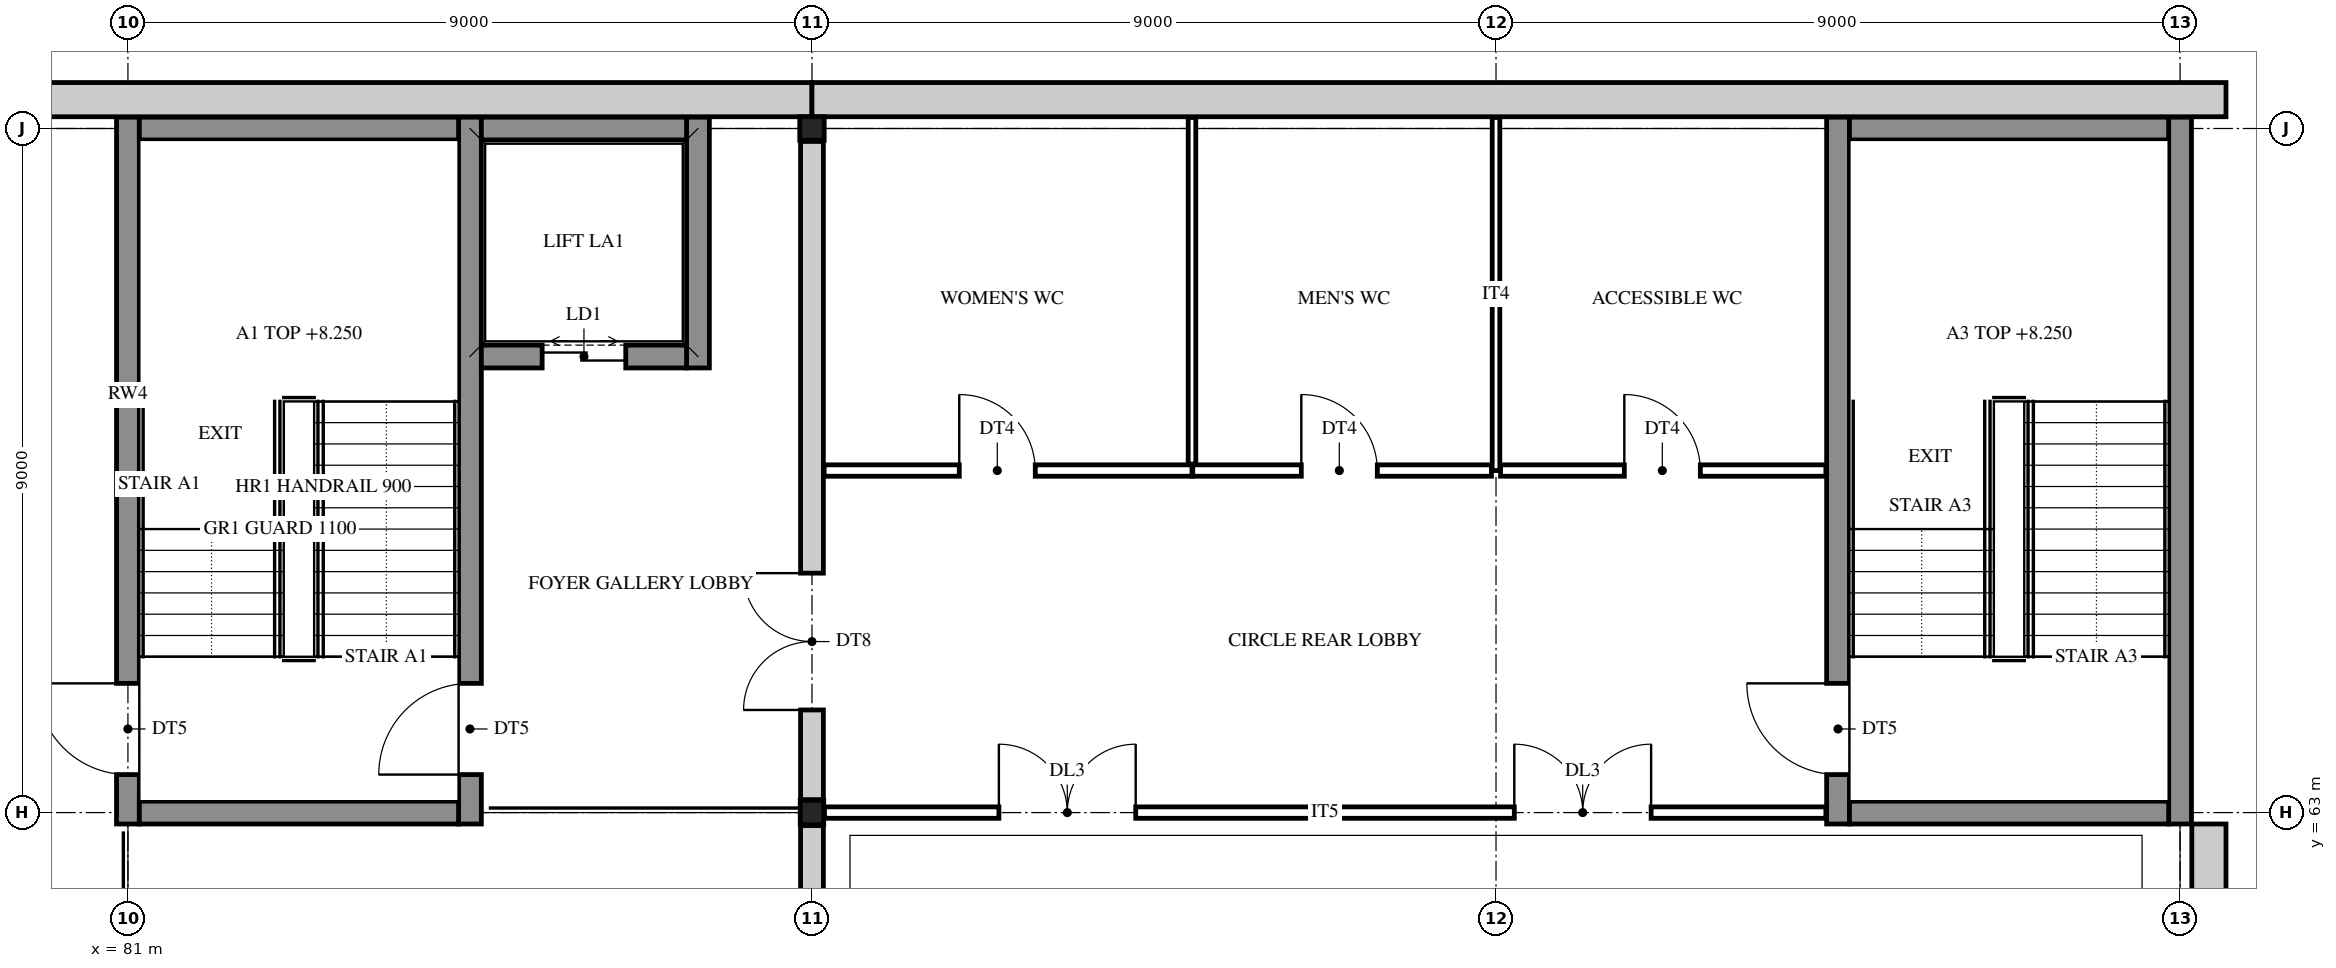
"""IFC4 building model, lengths in metres.
Left out: names, types, materials, properties, quantities, classifications, styles, units other than length and angle.
Written with IfcOpenShell. Run it as: python <this file> out.ifc"""

import sys

from ifc_helpers import new_model, si_unit, direction, frame, frame_2d, origin, origin_2d, place, context, subcontext, project, spatial, rectangle, i_section, extrude, element, fill, save


model = new_model("IFC4")
c1 = context("Model", 3, precision=1e-05, world=origin(), true_north=direction((0.0, 1.0)))
c2 = subcontext(c1, "Body", "Model", "MODEL_VIEW")
j1 = project(units=[si_unit("LENGTHUNIT", "METRE"), si_unit("PLANEANGLEUNIT", "RADIAN")], contexts=[c1])
p1 = place(None, origin())
s1 = spatial("IfcSite", under=j1, at=p1, CompositionType="ELEMENT")
p2 = place(p1, origin())
s2 = spatial("IfcBuilding", under=s1, at=p2, CompositionType="ELEMENT")
p3 = place(p2, frame((0.0, 0.0, 6.0)))
s3 = spatial("IfcBuildingStorey", under=s2, at=p3, CompositionType="ELEMENT", Elevation=6.0)
for number, where, z_axis, x_axis in (
    (1, (90.0, 63.0, 0.0), (0.0, 0.0, 1.0), (1.0, 0.0, 0.0)),
    (2, (90.0, 72.0, 0.0), (0.0, 0.0, 1.0), (0.0, 1.0, 0.0)),
):
    element("IfcColumn", number, at=place(p3, frame(where, z_axis=z_axis, x_axis=x_axis)), inside=s3, PredefinedType="COLUMN", context=c2, shape_type="SweptSolid", body=[
        extrude(i_section(OverallWidth=0.309, OverallDepth=0.321, WebThickness=0.014, FlangeThickness=0.022, FilletRadius=0.017, at=origin_2d()), origin(), (0.0, 0.0, 1.0), 4.5),
    ])
p4 = place(p3, frame((81.0, 62.85, 0.0), z_axis=(0.0, 0.0, 1.0), x_axis=(0.0, 1.0, 0.0)))
e3 = element("IfcWall", 3, at=p4, inside=s3, PredefinedType="SHEAR", context=c2, shape_type="SweptSolid", body=[
    extrude(rectangle(XDim=9.3, YDim=0.3, at=frame_2d((4.65, 0.0))), origin(), (0.0, 0.0, 1.0), 4.5),
])
p5 = place(p4, frame((0.65, 0.0, 0.0)))
e4 = element("IfcOpeningElement", 4, at=p5, cuts=e3, PredefinedType="OPENING", context=c2, shape_type="SweptSolid", body=[
    extrude(rectangle(XDim=1.2, YDim=2.1, at=frame_2d((0.6, 1.05))), frame((0.0, 0.16, 0.0), z_axis=(0.0, -1.0, 0.0), x_axis=(1.0, 0.0, 0.0)), (0.0, 0.0, 1.0), 0.32),
])
p6 = place(p3, frame((85.5, 62.85, 0.0), z_axis=(0.0, 0.0, 1.0), x_axis=(0.0, 1.0, 0.0)))
e5 = element("IfcWall", 5, at=p6, inside=s3, PredefinedType="SHEAR", context=c2, shape_type="SweptSolid", body=[
    extrude(rectangle(XDim=9.3, YDim=0.3, at=frame_2d((4.65, 0.0))), origin(), (0.0, 0.0, 1.0), 4.5),
])
p7 = place(p6, frame((0.65, 0.0, 0.0)))
e6 = element("IfcOpeningElement", 6, at=p7, cuts=e5, PredefinedType="OPENING", context=c2, shape_type="SweptSolid", body=[
    extrude(rectangle(XDim=1.2, YDim=2.1, at=frame_2d((0.6, 1.05))), frame((0.0, 0.16, 0.0), z_axis=(0.0, -1.0, 0.0), x_axis=(1.0, 0.0, 0.0)), (0.0, 0.0, 1.0), 0.32),
])
p8 = place(p3, frame((88.5, 68.85, 0.0), z_axis=(0.0, 0.0, 1.0), x_axis=(0.0, 1.0, 0.0)))
e7 = element("IfcWall", 7, at=p8, inside=s3, PredefinedType="SHEAR", context=c2, shape_type="SweptSolid", body=[
    extrude(rectangle(XDim=3.3, YDim=0.3, at=frame_2d((1.65, 0.0))), origin(), (0.0, 0.0, 1.0), 4.5),
])
p9 = place(p3, frame((103.5, 62.85, 0.0), z_axis=(0.0, 0.0, 1.0), x_axis=(0.0, 1.0, 0.0)))
e8 = element("IfcWall", 8, at=p9, inside=s3, PredefinedType="SHEAR", context=c2, shape_type="SweptSolid", body=[
    extrude(rectangle(XDim=9.3, YDim=0.3, at=frame_2d((4.65, 0.0))), origin(), (0.0, 0.0, 1.0), 4.5),
])
p10 = place(p9, frame((0.65, 0.0, 0.0)))
e9 = element("IfcOpeningElement", 9, at=p10, cuts=e8, PredefinedType="OPENING", context=c2, shape_type="SweptSolid", body=[
    extrude(rectangle(XDim=1.2, YDim=2.1, at=frame_2d((0.6, 1.05))), frame((0.0, 0.16, 0.0), z_axis=(0.0, -1.0, 0.0), x_axis=(1.0, 0.0, 0.0)), (0.0, 0.0, 1.0), 0.32),
])
p11 = place(p3, frame((108.0, 62.85, 0.0), z_axis=(0.0, 0.0, 1.0), x_axis=(0.0, 1.0, 0.0)))
e10 = element("IfcWall", 10, at=p11, inside=s3, PredefinedType="SHEAR", context=c2, shape_type="SweptSolid", body=[
    extrude(rectangle(XDim=9.3, YDim=0.3, at=frame_2d((4.65, 0.0))), origin(), (0.0, 0.0, 1.0), 4.5),
])
for number, where, z_axis, x_axis in (
    (11, (81.15, 63.0, 0.0), (0.0, 0.0, 1.0), (1.0, 0.0, 0.0)),
    (12, (103.65, 63.0, 0.0), (0.0, 0.0, 1.0), (1.0, 0.0, 0.0)),
):
    element("IfcWall", number, at=place(p3, frame(where, z_axis=z_axis, x_axis=x_axis)), inside=s3, PredefinedType="SHEAR", context=c2, shape_type="SweptSolid", body=[
        extrude(rectangle(XDim=4.2, YDim=0.3, at=frame_2d((2.1, 0.0))), origin(), (0.0, 0.0, 1.0), 4.5),
    ])
p12 = place(p3, frame((85.65, 69.0, 0.0), z_axis=(0.0, 0.0, 1.0), x_axis=(1.0, 0.0, 0.0)))
e13 = element("IfcWall", 13, at=p12, inside=s3, PredefinedType="SHEAR", context=c2, shape_type="SweptSolid", body=[
    extrude(rectangle(XDim=2.7, YDim=0.3, at=frame_2d((1.35, 0.0))), origin(), (0.0, 0.0, 1.0), 4.5),
])
p13 = place(p12, frame((0.8, 0.0, 0.0)))
e14 = element("IfcOpeningElement", 14, at=p13, cuts=e13, PredefinedType="OPENING", context=c2, shape_type="SweptSolid", body=[
    extrude(rectangle(XDim=1.1, YDim=2.1, at=frame_2d((0.55, 1.05))), frame((0.0, 0.16, 0.0), z_axis=(0.0, -1.0, 0.0), x_axis=(1.0, 0.0, 0.0)), (0.0, 0.0, 1.0), 0.32),
])
p14 = place(p3, frame((81.15, 72.0, 0.0), z_axis=(0.0, 0.0, 1.0), x_axis=(1.0, 0.0, 0.0)))
e15 = element("IfcWall", 15, at=p14, inside=s3, PredefinedType="SHEAR", context=c2, shape_type="SweptSolid", body=[
    extrude(rectangle(XDim=4.2, YDim=0.3, at=frame_2d((2.1, 0.0))), origin(), (0.0, 0.0, 1.0), 4.5),
])
p15 = place(p3, frame((85.65, 72.0, 0.0), z_axis=(0.0, 0.0, 1.0), x_axis=(1.0, 0.0, 0.0)))
e16 = element("IfcWall", 16, at=p15, inside=s3, PredefinedType="SHEAR", context=c2, shape_type="SweptSolid", body=[
    extrude(rectangle(XDim=2.7, YDim=0.3, at=frame_2d((1.35, 0.0))), origin(), (0.0, 0.0, 1.0), 4.5),
])
p16 = place(p3, frame((103.65, 72.0, 0.0), z_axis=(0.0, 0.0, 1.0), x_axis=(1.0, 0.0, 0.0)))
e17 = element("IfcWall", 17, at=p16, inside=s3, PredefinedType="SHEAR", context=c2, shape_type="SweptSolid", body=[
    extrude(rectangle(XDim=4.2, YDim=0.3, at=frame_2d((2.1, 0.0))), origin(), (0.0, 0.0, 1.0), 4.5),
])
p17 = place(p3, frame((75.75, 72.379, 0.0), z_axis=(0.0, 0.0, 1.0), x_axis=(1.0, 0.0, 0.0)))
e18 = element("IfcWall", 18, at=p17, inside=s3, PredefinedType="STANDARD", context=c2, shape_type="SweptSolid", body=[
    extrude(rectangle(XDim=14.25, YDim=0.45, at=frame_2d((7.125, 0.0))), origin(), (0.0, 0.0, 1.0), 4.5),
])
p18 = place(p17, frame((1.8, 0.0, 0.9)))
e19 = element("IfcOpeningElement", 19, at=p18, cuts=e18, PredefinedType="OPENING", context=c2, shape_type="SweptSolid", body=[
    extrude(rectangle(XDim=2.4, YDim=2.8, at=frame_2d((1.2, 1.4))), frame((0.0, 0.235, 0.0), z_axis=(0.0, -1.0, 0.0), x_axis=(1.0, 0.0, 0.0)), (0.0, 0.0, 1.0), 0.47),
])
p19 = place(p3, frame((90.0, 72.379, 0.0), z_axis=(0.0, 0.0, 1.0), x_axis=(1.0, 0.0, 0.0)))
e20 = element("IfcWall", 20, at=p19, inside=s3, PredefinedType="STANDARD", context=c2, shape_type="SweptSolid", body=[
    extrude(rectangle(XDim=18.604, YDim=0.45, at=frame_2d((9.302, 0.0))), origin(), (0.0, 0.0, 1.0), 4.5),
])
p20 = place(p3, frame((108.379, 62.85, 0.0), z_axis=(0.0, 0.0, 1.0), x_axis=(0.0, -1.0, 0.0)))
e21 = element("IfcWall", 21, at=p20, inside=s3, PredefinedType="STANDARD", context=c2, shape_type="SweptSolid", body=[
    extrude(rectangle(XDim=17.7, YDim=0.45, at=frame_2d((8.85, 0.0))), origin(), (0.0, 0.0, 1.0), 4.5),
])
p21 = place(p3, frame((90.0, 54.17, 0.0), z_axis=(0.0, 0.0, 1.0), x_axis=(0.0, 1.0, 0.0)))
e22 = element("IfcWall", 22, at=p21, inside=s3, PredefinedType="STANDARD", context=c2, shape_type="SweptSolid", body=[
    extrude(rectangle(XDim=8.659, YDim=0.3, at=frame_2d((4.33, 0.0))), origin(), (0.0, 0.0, 1.0), 3.718),
])
p22 = place(p3, frame((90.0, 63.17, 0.0), z_axis=(0.0, 0.0, 1.0), x_axis=(0.0, 1.0, 0.0)))
e23 = element("IfcWall", 23, at=p22, inside=s3, PredefinedType="STANDARD", context=c2, shape_type="SweptSolid", body=[
    extrude(rectangle(XDim=8.659, YDim=0.3, at=frame_2d((4.33, 0.0))), origin(), (0.0, 0.0, 1.0), 3.718),
])
p23 = place(p22, frame((1.179, 0.0, 0.0)))
e24 = element("IfcOpeningElement", 24, at=p23, cuts=e23, PredefinedType="OPENING", context=c2, shape_type="SweptSolid", body=[
    extrude(rectangle(XDim=1.8, YDim=2.1, at=frame_2d((0.9, 1.05))), frame((0.0, 0.16, 0.0), z_axis=(0.0, -1.0, 0.0), x_axis=(1.0, 0.0, 0.0)), (0.0, 0.0, 1.0), 0.32),
])
p24 = place(p3, frame((95.0, 67.585, 0.0), z_axis=(0.0, 0.0, 1.0), x_axis=(0.0, 1.0, 0.0)))
e25 = element("IfcWall", 25, at=p24, inside=s3, PredefinedType="PARTITIONING", context=c2, shape_type="SweptSolid", body=[
    extrude(rectangle(XDim=4.56, YDim=0.1, at=frame_2d((2.28, 0.0))), origin(), (0.0, 0.0, 1.0), 3.718),
])
p25 = place(p3, frame((99.0, 67.5, 0.0), z_axis=(0.0, 0.0, 1.0), x_axis=(0.0, 1.0, 0.0)))
e26 = element("IfcWall", 26, at=p25, inside=s3, PredefinedType="PARTITIONING", context=c2, shape_type="SweptSolid", body=[
    extrude(rectangle(XDim=4.645, YDim=0.1, at=frame_2d((2.322, 0.0))), origin(), (0.0, 0.0, 1.0), 3.718),
])
p26 = place(p3, frame((90.165, 63.0, 0.0), z_axis=(0.0, 0.0, 1.0), x_axis=(1.0, 0.0, 0.0)))
e27 = element("IfcWall", 27, at=p26, inside=s3, PredefinedType="PARTITIONING", context=c2, shape_type="SweptSolid", body=[
    extrude(rectangle(XDim=13.176, YDim=0.15, at=frame_2d((6.588, 0.0))), origin(), (0.0, 0.0, 1.0), 3.718),
])
p27 = place(p26, frame((2.295, 0.0, 0.0)))
e28 = element("IfcOpeningElement", 28, at=p27, cuts=e27, PredefinedType="OPENING", context=c2, shape_type="SweptSolid", body=[
    extrude(rectangle(XDim=1.8, YDim=2.1, at=frame_2d((0.9, 1.05))), frame((0.0, 0.085, 0.0), z_axis=(0.0, -1.0, 0.0), x_axis=(1.0, 0.0, 0.0)), (0.0, 0.0, 1.0), 0.17),
])
p28 = place(p26, frame((9.076, 0.0, 0.0)))
e29 = element("IfcOpeningElement", 29, at=p28, cuts=e27, PredefinedType="OPENING", context=c2, shape_type="SweptSolid", body=[
    extrude(rectangle(XDim=1.8, YDim=2.1, at=frame_2d((0.9, 1.05))), frame((0.0, 0.085, 0.0), z_axis=(0.0, -1.0, 0.0), x_axis=(1.0, 0.0, 0.0)), (0.0, 0.0, 1.0), 0.17),
])
p29 = place(p3, frame((90.16, 67.5, 0.0), z_axis=(0.0, 0.0, 1.0), x_axis=(1.0, 0.0, 0.0)))
e30 = element("IfcWall", 30, at=p29, inside=s3, PredefinedType="PARTITIONING", context=c2, shape_type="SweptSolid", body=[
    extrude(rectangle(XDim=4.84, YDim=0.15, at=frame_2d((2.42, 0.0))), origin(), (0.0, 0.0, 1.0), 3.718),
])
p30 = place(p29, frame((1.778, 0.0, 0.0)))
e31 = element("IfcOpeningElement", 31, at=p30, cuts=e30, PredefinedType="OPENING", context=c2, shape_type="SweptSolid", body=[
    extrude(rectangle(XDim=1.0, YDim=2.1, at=frame_2d((0.5, 1.05))), frame((0.0, 0.085, 0.0), z_axis=(0.0, -1.0, 0.0), x_axis=(1.0, 0.0, 0.0)), (0.0, 0.0, 1.0), 0.17),
])
p31 = place(p3, frame((95.01, 67.5, 0.0), z_axis=(0.0, 0.0, 1.0), x_axis=(1.0, 0.0, 0.0)))
e32 = element("IfcWall", 32, at=p31, inside=s3, PredefinedType="PARTITIONING", context=c2, shape_type="SweptSolid", body=[
    extrude(rectangle(XDim=3.93, YDim=0.15, at=frame_2d((1.965, 0.0))), origin(), (0.0, 0.0, 1.0), 3.718),
])
p32 = place(p31, frame((1.428, 0.0, 0.0)))
e33 = element("IfcOpeningElement", 33, at=p32, cuts=e32, PredefinedType="OPENING", context=c2, shape_type="SweptSolid", body=[
    extrude(rectangle(XDim=1.0, YDim=2.1, at=frame_2d((0.5, 1.05))), frame((0.0, 0.085, 0.0), z_axis=(0.0, -1.0, 0.0), x_axis=(1.0, 0.0, 0.0)), (0.0, 0.0, 1.0), 0.17),
])
p33 = place(p3, frame((99.06, 67.5, 0.0), z_axis=(0.0, 0.0, 1.0), x_axis=(1.0, 0.0, 0.0)))
e34 = element("IfcWall", 34, at=p33, inside=s3, PredefinedType="PARTITIONING", context=c2, shape_type="SweptSolid", body=[
    extrude(rectangle(XDim=4.28, YDim=0.15, at=frame_2d((2.14, 0.0))), origin(), (0.0, 0.0, 1.0), 3.718),
])
p34 = place(p33, frame((1.628, 0.0, 0.0)))
e35 = element("IfcOpeningElement", 35, at=p34, cuts=e34, PredefinedType="OPENING", context=c2, shape_type="SweptSolid", body=[
    extrude(rectangle(XDim=1.0, YDim=2.1, at=frame_2d((0.5, 1.05))), frame((0.0, 0.085, 0.0), z_axis=(0.0, -1.0, 0.0), x_axis=(1.0, 0.0, 0.0)), (0.0, 0.0, 1.0), 0.17),
])
p35 = place(p27, origin())
e36 = element("IfcDoor", 36, at=p35, inside=s3, OperationType="DOUBLE_DOOR_SINGLE_SWING", PredefinedType="DOOR", context=c2, shape_type="SweptSolid", body=[
    extrude(rectangle(XDim=1.8, YDim=2.1, at=frame_2d((0.9, 1.05))), frame((0.0, 0.025, 0.0), z_axis=(0.0, -1.0, 0.0), x_axis=(1.0, 0.0, 0.0)), (0.0, 0.0, 1.0), 0.05),
])
fill(e28, e36)
p36 = place(p28, origin())
e37 = element("IfcDoor", 37, at=p36, inside=s3, OperationType="DOUBLE_DOOR_SINGLE_SWING", PredefinedType="DOOR", context=c2, shape_type="SweptSolid", body=[
    extrude(rectangle(XDim=1.8, YDim=2.1, at=frame_2d((0.9, 1.05))), frame((0.0, 0.025, 0.0), z_axis=(0.0, -1.0, 0.0), x_axis=(1.0, 0.0, 0.0)), (0.0, 0.0, 1.0), 0.05),
])
fill(e29, e37)
p37 = place(p23, origin())
e38 = element("IfcDoor", 38, at=p37, inside=s3, OperationType="DOUBLE_DOOR_SINGLE_SWING", PredefinedType="DOOR", context=c2, shape_type="SweptSolid", body=[
    extrude(rectangle(XDim=1.8, YDim=2.1, at=frame_2d((0.9, 1.05))), frame((0.0, 0.025, 0.0), z_axis=(0.0, -1.0, 0.0), x_axis=(1.0, 0.0, 0.0)), (0.0, 0.0, 1.0), 0.05),
])
fill(e24, e38)
p38 = place(p30, origin())
e39 = element("IfcDoor", 39, at=p38, inside=s3, OperationType="SINGLE_SWING_LEFT", PredefinedType="DOOR", context=c2, shape_type="SweptSolid", body=[
    extrude(rectangle(XDim=1.0, YDim=2.1, at=frame_2d((0.5, 1.05))), frame((0.0, 0.025, 0.0), z_axis=(0.0, -1.0, 0.0), x_axis=(1.0, 0.0, 0.0)), (0.0, 0.0, 1.0), 0.05),
])
fill(e31, e39)
p39 = place(p32, origin())
e40 = element("IfcDoor", 40, at=p39, inside=s3, OperationType="SINGLE_SWING_LEFT", PredefinedType="DOOR", context=c2, shape_type="SweptSolid", body=[
    extrude(rectangle(XDim=1.0, YDim=2.1, at=frame_2d((0.5, 1.05))), frame((0.0, 0.025, 0.0), z_axis=(0.0, -1.0, 0.0), x_axis=(1.0, 0.0, 0.0)), (0.0, 0.0, 1.0), 0.05),
])
fill(e33, e40)
p40 = place(p34, origin())
e41 = element("IfcDoor", 41, at=p40, inside=s3, OperationType="SINGLE_SWING_LEFT", PredefinedType="DOOR", context=c2, shape_type="SweptSolid", body=[
    extrude(rectangle(XDim=1.0, YDim=2.1, at=frame_2d((0.5, 1.05))), frame((0.0, 0.025, 0.0), z_axis=(0.0, -1.0, 0.0), x_axis=(1.0, 0.0, 0.0)), (0.0, 0.0, 1.0), 0.05),
])
fill(e35, e41)
p41 = place(p7, origin())
e42 = element("IfcDoor", 42, at=p41, inside=s3, OperationType="SINGLE_SWING_LEFT", PredefinedType="DOOR", context=c2, shape_type="SweptSolid", body=[
    extrude(rectangle(XDim=1.2, YDim=2.1, at=frame_2d((0.6, 1.05))), frame((0.0, 0.025, 0.0), z_axis=(0.0, -1.0, 0.0), x_axis=(1.0, 0.0, 0.0)), (0.0, 0.0, 1.0), 0.05),
])
fill(e6, e42)
p42 = place(p5, frame((1.2, 0.0, 0.0), z_axis=(0.0, 0.0, 1.0), x_axis=(-1.0, 0.0, 0.0)))
e43 = element("IfcDoor", 43, at=p42, inside=s3, OperationType="SINGLE_SWING_RIGHT", PredefinedType="DOOR", context=c2, shape_type="SweptSolid", body=[
    extrude(rectangle(XDim=1.2, YDim=2.1, at=frame_2d((0.6, 1.05))), frame((0.0, 0.025, 0.0), z_axis=(0.0, -1.0, 0.0), x_axis=(1.0, 0.0, 0.0)), (0.0, 0.0, 1.0), 0.05),
])
fill(e4, e43)
p43 = place(p10, frame((1.2, 0.0, 0.0), z_axis=(0.0, 0.0, 1.0), x_axis=(-1.0, 0.0, 0.0)))
e44 = element("IfcDoor", 44, at=p43, inside=s3, OperationType="SINGLE_SWING_RIGHT", PredefinedType="DOOR", context=c2, shape_type="SweptSolid", body=[
    extrude(rectangle(XDim=1.2, YDim=2.1, at=frame_2d((0.6, 1.05))), frame((0.0, 0.025, 0.0), z_axis=(0.0, -1.0, 0.0), x_axis=(1.0, 0.0, 0.0)), (0.0, 0.0, 1.0), 0.05),
])
fill(e9, e44)
p44 = place(p13, origin())
e45 = element("IfcDoor", 45, at=p44, inside=s3, OperationType="DOUBLE_DOOR_SLIDING", PredefinedType="DOOR", context=c2, shape_type="SweptSolid", body=[
    extrude(rectangle(XDim=1.1, YDim=2.1, at=frame_2d((0.55, 1.05))), frame((0.0, 0.025, 0.0), z_axis=(0.0, -1.0, 0.0), x_axis=(1.0, 0.0, 0.0)), (0.0, 0.0, 1.0), 0.05),
])
fill(e14, e45)
save(model, sys.argv[1])
